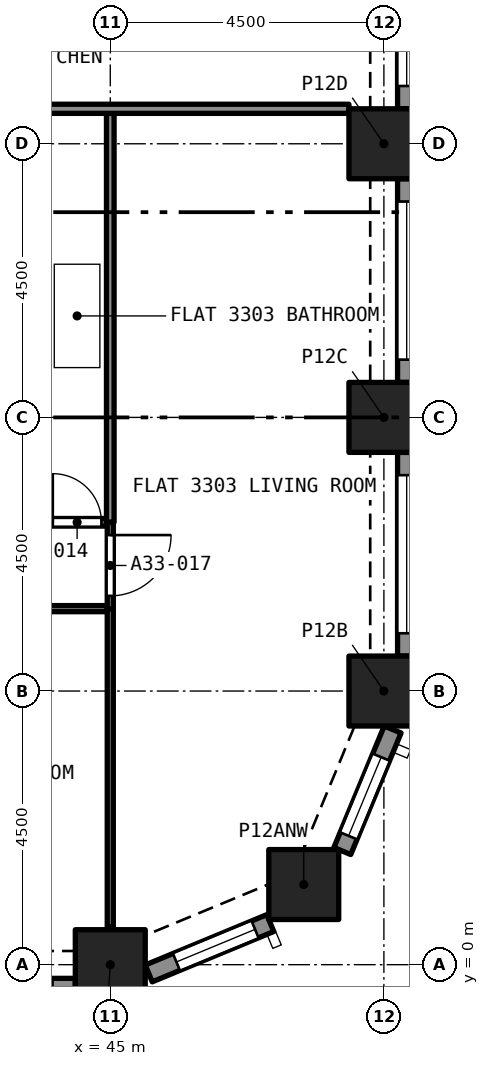
"""IFC4 building model, lengths in metres.
Left out: names, types, materials, properties, quantities, classifications, styles, units other than length and angle.
Written with IfcOpenShell. Run it as: python <this file> out.ifc"""

import sys

from ifc_helpers import new_model, si_unit, direction, frame, frame_2d, origin, origin_2d, place, context, subcontext, project, spatial, rectangle, extrude, element, fill, save


model = new_model("IFC4")
c1 = context("Model", 3, precision=1e-05, world=origin(), true_north=direction((0.0, 1.0)))
c2 = subcontext(c1, "Body", "Model", "MODEL_VIEW")
j1 = project(units=[si_unit("LENGTHUNIT", "METRE"), si_unit("PLANEANGLEUNIT", "RADIAN")], contexts=[c1])
p1 = place(None, origin())
s1 = spatial("IfcSite", under=j1, at=p1, CompositionType="ELEMENT")
p2 = place(p1, origin())
s2 = spatial("IfcBuilding", under=s1, at=p2, CompositionType="ELEMENT")
p3 = place(p2, frame((0.0, 0.0, 118.4)))
s3 = spatial("IfcBuildingStorey", under=s2, at=p3, CompositionType="ELEMENT", Elevation=118.4)
for number, where, z_axis, x_axis in (
    (1, (45.0, 0.0, 0.0), (0.0, 0.0, 1.0), (1.0, 0.0, 0.0)),
    (2, (48.182, 1.318, 0.0), (0.0, 0.0, 1.0), (1.0, 0.0, 0.0)),
    (3, (49.5, 4.5, 0.0), (0.0, 0.0, 1.0), (1.0, 0.0, 0.0)),
    (4, (49.5, 9.0, 0.0), (0.0, 0.0, 1.0), (1.0, 0.0, 0.0)),
    (5, (49.5, 13.5, 0.0), (0.0, 0.0, 1.0), (1.0, 0.0, 0.0)),
):
    element("IfcColumn", number, at=place(p3, frame(where, z_axis=z_axis, x_axis=x_axis)), inside=s3, PredefinedType="COLUMN", context=c2, shape_type="SweptSolid", body=[
        extrude(rectangle(XDim=1.15, YDim=1.15, at=origin_2d()), origin(), (0.0, 0.0, 1.0), 3.2),
    ])
p4 = place(p3, frame((44.425, -0.375, 0.0), z_axis=(0.0, 0.0, 1.0), x_axis=(-1.0, 0.0, 0.0)))
e6 = element("IfcWall", 6, at=p4, inside=s3, PredefinedType="SOLIDWALL", context=c2, shape_type="SweptSolid", body=[
    extrude(rectangle(XDim=3.35, YDim=0.3, at=frame_2d((1.675, 0.0))), origin(), (0.0, 0.0, 1.0), 3.2),
])
p5 = place(p4, frame((0.375, 0.0, 0.45)))
e7 = element("IfcOpeningElement", 7, at=p5, cuts=e6, PredefinedType="OPENING", context=c2, shape_type="SweptSolid", body=[
    extrude(rectangle(XDim=2.6, YDim=1.95, at=frame_2d((1.3, 0.975))), frame((0.0, 0.16, 0.0), z_axis=(0.0, -1.0, 0.0), x_axis=(1.0, 0.0, 0.0)), (0.0, 0.0, 1.0), 0.32),
])
p6 = place(p3, frame((47.631, 0.684, 0.0), z_axis=(0.0, 0.0, 1.0), x_axis=(-0.923862802911, -0.382723818695, 0.0)))
e8 = element("IfcWall", 8, at=p6, inside=s3, PredefinedType="SOLIDWALL", context=c2, shape_type="SweptSolid", body=[
    extrude(rectangle(XDim=2.164, YDim=0.3, at=frame_2d((1.082, 0.0))), origin(), (0.0, 0.0, 1.0), 3.2),
])
p7 = place(p6, frame((0.271, 0.0, 0.45)))
e9 = element("IfcOpeningElement", 9, at=p7, cuts=e8, PredefinedType="OPENING", context=c2, shape_type="SweptSolid", body=[
    extrude(rectangle(XDim=1.4, YDim=1.95, at=frame_2d((0.7, 0.975))), frame((0.0, 0.16, 0.0), z_axis=(0.0, -1.0, 0.0), x_axis=(1.0, 0.0, 0.0)), (0.0, 0.0, 1.0), 0.32),
])
p8 = place(p3, frame((49.644, 3.868, 0.0), z_axis=(0.0, 0.0, 1.0), x_axis=(-0.382723818695, -0.923862802911, 0.0)))
e10 = element("IfcWall", 10, at=p8, inside=s3, PredefinedType="SOLIDWALL", context=c2, shape_type="SweptSolid", body=[
    extrude(rectangle(XDim=2.164, YDim=0.3, at=frame_2d((1.082, 0.0))), origin(), (0.0, 0.0, 1.0), 3.2),
])
p9 = place(p8, frame((0.493, 0.0, 0.45)))
e11 = element("IfcOpeningElement", 11, at=p9, cuts=e10, PredefinedType="OPENING", context=c2, shape_type="SweptSolid", body=[
    extrude(rectangle(XDim=1.4, YDim=1.95, at=frame_2d((0.7, 0.975))), frame((0.0, 0.16, 0.0), z_axis=(0.0, -1.0, 0.0), x_axis=(1.0, 0.0, 0.0)), (0.0, 0.0, 1.0), 0.32),
])
p10 = place(p3, frame((49.875, 8.425, 0.0), z_axis=(0.0, 0.0, 1.0), x_axis=(0.0, -1.0, 0.0)))
e12 = element("IfcWall", 12, at=p10, inside=s3, PredefinedType="SOLIDWALL", context=c2, shape_type="SweptSolid", body=[
    extrude(rectangle(XDim=3.35, YDim=0.3, at=frame_2d((1.675, 0.0))), origin(), (0.0, 0.0, 1.0), 3.2),
])
p11 = place(p10, frame((0.375, 0.0, 0.45)))
e13 = element("IfcOpeningElement", 13, at=p11, cuts=e12, PredefinedType="OPENING", context=c2, shape_type="SweptSolid", body=[
    extrude(rectangle(XDim=2.6, YDim=1.95, at=frame_2d((1.3, 0.975))), frame((0.0, 0.16, 0.0), z_axis=(0.0, -1.0, 0.0), x_axis=(1.0, 0.0, 0.0)), (0.0, 0.0, 1.0), 0.32),
])
p12 = place(p3, frame((49.875, 12.925, 0.0), z_axis=(0.0, 0.0, 1.0), x_axis=(0.0, -1.0, 0.0)))
e14 = element("IfcWall", 14, at=p12, inside=s3, PredefinedType="SOLIDWALL", context=c2, shape_type="SweptSolid", body=[
    extrude(rectangle(XDim=3.35, YDim=0.3, at=frame_2d((1.675, 0.0))), origin(), (0.0, 0.0, 1.0), 3.2),
])
p13 = place(p12, frame((0.375, 0.0, 0.45)))
e15 = element("IfcOpeningElement", 15, at=p13, cuts=e14, PredefinedType="OPENING", context=c2, shape_type="SweptSolid", body=[
    extrude(rectangle(XDim=2.6, YDim=1.95, at=frame_2d((1.3, 0.975))), frame((0.0, 0.16, 0.0), z_axis=(0.0, -1.0, 0.0), x_axis=(1.0, 0.0, 0.0)), (0.0, 0.0, 1.0), 0.32),
])
p14 = place(p3, frame((49.875, 17.425, 0.0), z_axis=(0.0, 0.0, 1.0), x_axis=(0.0, -1.0, 0.0)))
e16 = element("IfcWall", 16, at=p14, inside=s3, PredefinedType="SOLIDWALL", context=c2, shape_type="SweptSolid", body=[
    extrude(rectangle(XDim=3.35, YDim=0.3, at=frame_2d((1.675, 0.0))), origin(), (0.0, 0.0, 1.0), 3.2),
])
p15 = place(p14, frame((0.375, 0.0, 0.45)))
e17 = element("IfcOpeningElement", 17, at=p15, cuts=e16, PredefinedType="OPENING", context=c2, shape_type="SweptSolid", body=[
    extrude(rectangle(XDim=2.6, YDim=1.95, at=frame_2d((1.3, 0.975))), frame((0.0, 0.16, 0.0), z_axis=(0.0, -1.0, 0.0), x_axis=(1.0, 0.0, 0.0)), (0.0, 0.0, 1.0), 0.32),
])
p16 = place(p3, frame((43.909, 7.275, 0.0), z_axis=(0.0, 0.0, 1.0), x_axis=(1.0, 0.0, 0.0)))
e18 = element("IfcWall", 18, at=p16, inside=s3, PredefinedType="PARTITIONING", context=c2, shape_type="SweptSolid", body=[
    extrude(rectangle(XDim=1.028, YDim=0.125, at=frame_2d((0.514, 0.0))), origin(), (0.0, 0.0, 1.0), 2.9),
])
p17 = place(p16, frame((0.146, 0.0, 0.0)))
e19 = element("IfcOpeningElement", 19, at=p17, cuts=e18, PredefinedType="OPENING", context=c2, shape_type="SweptSolid", body=[
    extrude(rectangle(XDim=0.8, YDim=2.1, at=frame_2d((0.4, 1.05))), frame((0.0, 0.073, 0.0), z_axis=(0.0, -1.0, 0.0), x_axis=(1.0, 0.0, 0.0)), (0.0, 0.0, 1.0), 0.145),
])
p18 = place(p3, frame((45.0, 7.275, 0.0), z_axis=(0.0, 0.0, 1.0), x_axis=(0.0, 1.0, 0.0)))
e20 = element("IfcWall", 20, at=p18, inside=s3, PredefinedType="PARTITIONING", context=c2, shape_type="SweptSolid", body=[
    extrude(rectangle(XDim=6.725, YDim=0.125, at=frame_2d((3.363, 0.0))), origin(), (0.0, 0.0, 1.0), 2.9),
])
p19 = place(p3, frame((44.95, 5.855, 0.0), z_axis=(0.0, 0.0, 1.0), x_axis=(-1.0, 0.0, 0.0)))
e21 = element("IfcWall", 21, at=p19, inside=s3, PredefinedType="PARTITIONING", context=c2, shape_type="SweptSolid", body=[
    extrude(rectangle(XDim=4.35, YDim=0.1, at=frame_2d((2.175, 0.0))), origin(), (0.0, 0.0, 1.0), 2.9),
])
p20 = place(p19, frame((1.75, 0.0, 0.0)))
e22 = element("IfcOpeningElement", 22, at=p20, cuts=e21, PredefinedType="OPENING", context=c2, shape_type="SweptSolid", body=[
    extrude(rectangle(XDim=0.9, YDim=2.1, at=frame_2d((0.45, 1.05))), frame((0.0, 0.06, 0.0), z_axis=(0.0, -1.0, 0.0), x_axis=(1.0, 0.0, 0.0)), (0.0, 0.0, 1.0), 0.12),
])
p21 = place(p3, frame((45.0, 0.622, 0.0), z_axis=(0.0, 0.0, 1.0), x_axis=(0.0, 1.0, 0.0)))
e23 = element("IfcWall", 23, at=p21, inside=s3, PredefinedType="PARTITIONING", context=c2, shape_type="SweptSolid", body=[
    extrude(rectangle(XDim=5.233, YDim=0.1, at=frame_2d((2.616, 0.0))), origin(), (0.0, 0.0, 1.0), 2.9),
])
p22 = place(p3, frame((45.0, 7.275, 0.0), z_axis=(0.0, 0.0, 1.0), x_axis=(0.0, -1.0, 0.0)))
e24 = element("IfcWall", 24, at=p22, inside=s3, PredefinedType="PARTITIONING", context=c2, shape_type="SweptSolid", body=[
    extrude(rectangle(XDim=1.42, YDim=0.1, at=frame_2d((0.71, 0.0))), origin(), (0.0, 0.0, 1.0), 2.9),
])
p23 = place(p22, frame((0.21, 0.0, 0.0)))
e25 = element("IfcOpeningElement", 25, at=p23, cuts=e24, PredefinedType="OPENING", context=c2, shape_type="SweptSolid", body=[
    extrude(rectangle(XDim=1.0, YDim=2.1, at=frame_2d((0.5, 1.05))), frame((0.0, 0.06, 0.0), z_axis=(0.0, -1.0, 0.0), x_axis=(1.0, 0.0, 0.0)), (0.0, 0.0, 1.0), 0.12),
])
p24 = place(p3, frame((42.6, 14.075, 0.0), z_axis=(0.0, 0.0, 1.0), x_axis=(1.0, 0.0, 0.0)))
e26 = element("IfcWall", 26, at=p24, inside=s3, PredefinedType="PARTITIONING", context=c2, shape_type="SweptSolid", body=[
    extrude(rectangle(XDim=6.325, YDim=0.15, at=frame_2d((3.163, 0.0))), origin(), (0.0, 0.0, 1.0), 2.9),
])
p25 = place(p7, origin())
e27 = element("IfcWindow", 27, at=p25, inside=s3, PartitioningType="SINGLE_PANEL", PredefinedType="WINDOW", context=c2, shape_type="SweptSolid", body=[
    extrude(rectangle(XDim=1.4, YDim=1.95, at=frame_2d((0.7, 0.975))), frame((0.0, 0.03, 0.0), z_axis=(0.0, -1.0, 0.0), x_axis=(1.0, 0.0, 0.0)), (0.0, 0.0, 1.0), 0.06),
])
fill(e9, e27)
p26 = place(p9, origin())
e28 = element("IfcWindow", 28, at=p26, inside=s3, PartitioningType="SINGLE_PANEL", PredefinedType="WINDOW", context=c2, shape_type="SweptSolid", body=[
    extrude(rectangle(XDim=1.4, YDim=1.95, at=frame_2d((0.7, 0.975))), frame((0.0, 0.03, 0.0), z_axis=(0.0, -1.0, 0.0), x_axis=(1.0, 0.0, 0.0)), (0.0, 0.0, 1.0), 0.06),
])
fill(e11, e28)
p27 = place(p11, origin())
e29 = element("IfcWindow", 29, at=p27, inside=s3, PartitioningType="SINGLE_PANEL", PredefinedType="WINDOW", context=c2, shape_type="SweptSolid", body=[
    extrude(rectangle(XDim=2.6, YDim=1.95, at=frame_2d((1.3, 0.975))), frame((0.0, 0.03, 0.0), z_axis=(0.0, -1.0, 0.0), x_axis=(1.0, 0.0, 0.0)), (0.0, 0.0, 1.0), 0.06),
])
fill(e13, e29)
p28 = place(p13, origin())
e30 = element("IfcWindow", 30, at=p28, inside=s3, PartitioningType="SINGLE_PANEL", PredefinedType="WINDOW", context=c2, shape_type="SweptSolid", body=[
    extrude(rectangle(XDim=2.6, YDim=1.95, at=frame_2d((1.3, 0.975))), frame((0.0, 0.03, 0.0), z_axis=(0.0, -1.0, 0.0), x_axis=(1.0, 0.0, 0.0)), (0.0, 0.0, 1.0), 0.06),
])
fill(e15, e30)
p29 = place(p15, origin())
e31 = element("IfcWindow", 31, at=p29, inside=s3, PartitioningType="SINGLE_PANEL", PredefinedType="WINDOW", context=c2, shape_type="SweptSolid", body=[
    extrude(rectangle(XDim=2.6, YDim=1.95, at=frame_2d((1.3, 0.975))), frame((0.0, 0.03, 0.0), z_axis=(0.0, -1.0, 0.0), x_axis=(1.0, 0.0, 0.0)), (0.0, 0.0, 1.0), 0.06),
])
fill(e17, e31)
p30 = place(p17, origin())
e32 = element("IfcDoor", 32, at=p30, inside=s3, OperationType="SINGLE_SWING_RIGHT", PredefinedType="DOOR", context=c2, shape_type="SweptSolid", body=[
    extrude(rectangle(XDim=0.8, YDim=2.1, at=frame_2d((0.4, 1.05))), frame((0.0, 0.025, 0.0), z_axis=(0.0, -1.0, 0.0), x_axis=(1.0, 0.0, 0.0)), (0.0, 0.0, 1.0), 0.05),
])
fill(e19, e32)
p31 = place(p23, origin())
e33 = element("IfcDoor", 33, at=p31, inside=s3, OperationType="SINGLE_SWING_RIGHT", PredefinedType="DOOR", context=c2, shape_type="SweptSolid", body=[
    extrude(rectangle(XDim=1.0, YDim=2.1, at=frame_2d((0.5, 1.05))), frame((0.0, 0.025, 0.0), z_axis=(0.0, -1.0, 0.0), x_axis=(1.0, 0.0, 0.0)), (0.0, 0.0, 1.0), 0.05),
])
fill(e25, e33)
save(model, sys.argv[1])
